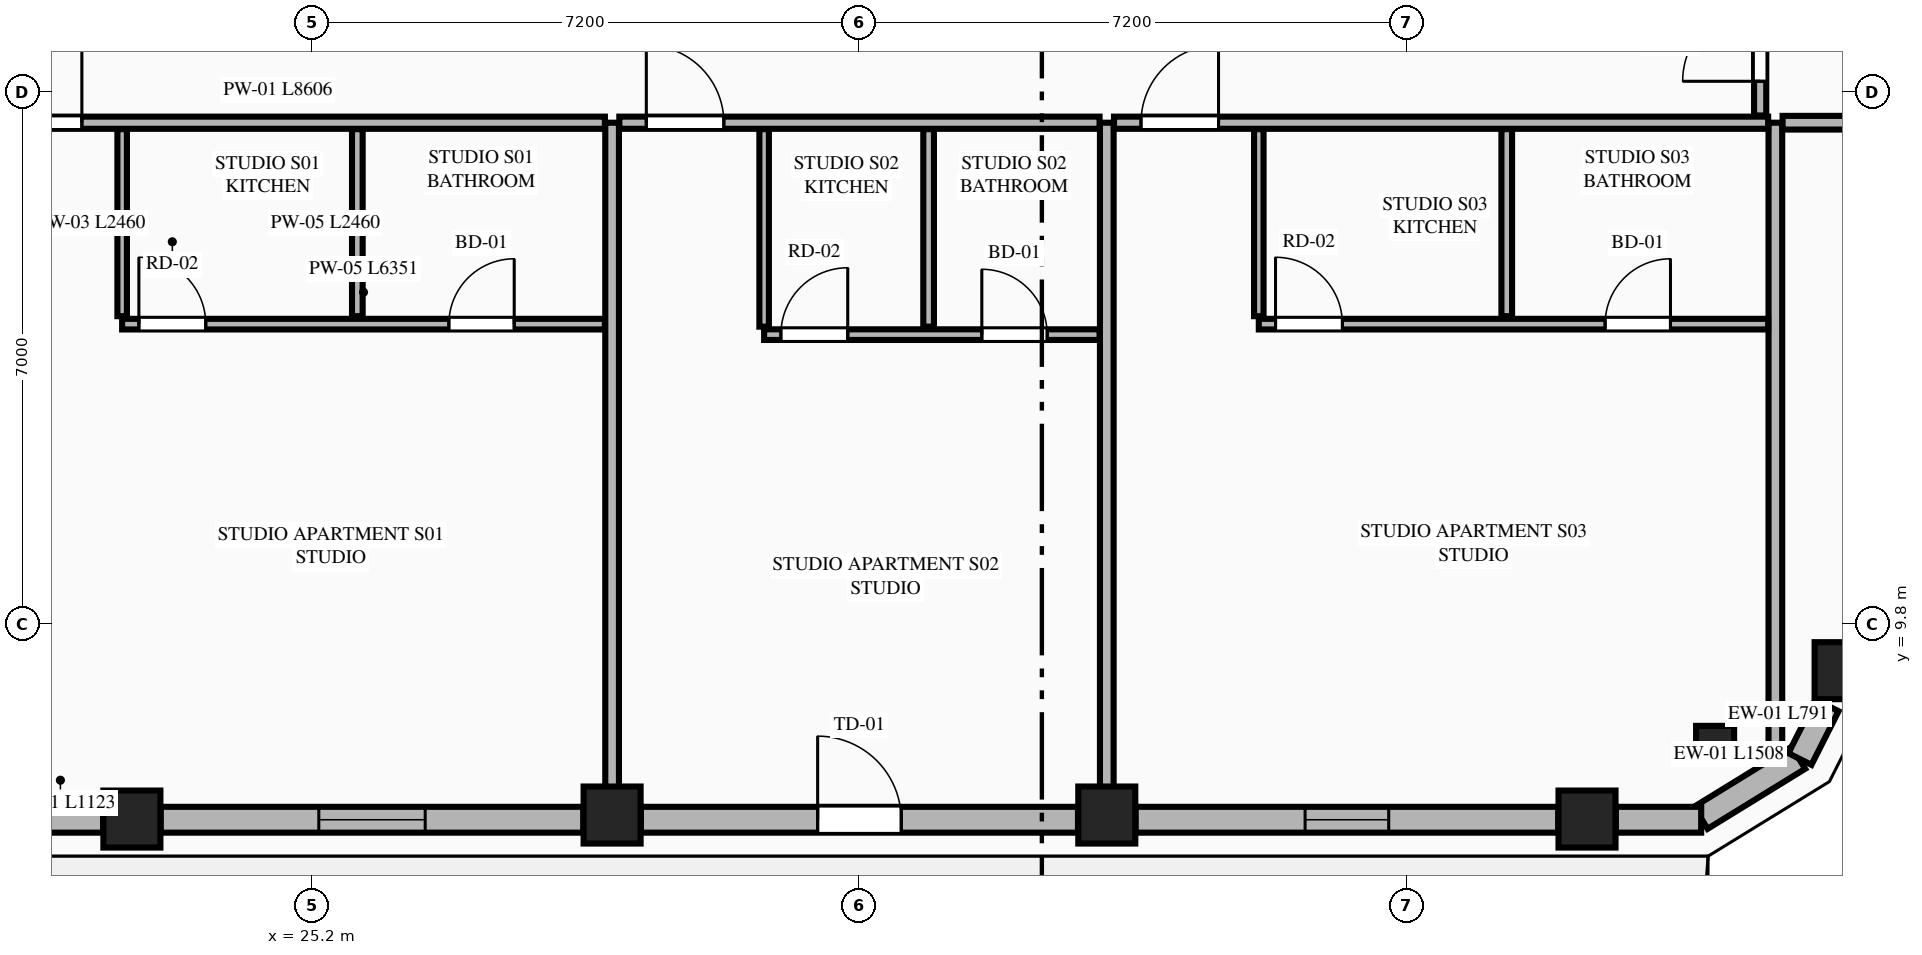
"""IFC4 building model, lengths in metres.
Left out: names, types, materials, properties, quantities, classifications, styles, units other than length and angle.
Written with IfcOpenShell. Run it as: python <this file> out.ifc"""

import sys

from ifc_helpers import new_model, si_unit, direction, frame, frame_2d, origin, origin_2d, place, context, subcontext, project, spatial, rectangle, extrude, element, fill, save


model = new_model("IFC4")
c1 = context("Model", 3, precision=1e-05, world=origin(), true_north=direction((0.0, 1.0)))
c2 = subcontext(c1, "Body", "Model", "MODEL_VIEW")
j1 = project(units=[si_unit("LENGTHUNIT", "METRE"), si_unit("PLANEANGLEUNIT", "RADIAN")], contexts=[c1])
p1 = place(None, origin())
s1 = spatial("IfcSite", under=j1, at=p1, CompositionType="ELEMENT")
p2 = place(p1, origin())
s2 = spatial("IfcBuilding", under=s1, at=p2, CompositionType="ELEMENT")
p3 = place(p2, frame((0.0, 0.0, 241.6)))
s3 = spatial("IfcBuildingStorey", under=s2, at=p3, CompositionType="ELEMENT", Elevation=241.6)
for number, where, z_axis, x_axis in (
    (1, (22.828, 7.239, 0.0), (0.0, 0.0, 1.0), (1.0, 0.0, 0.0)),
    (2, (29.146, 7.292, 0.0), (0.0, 0.0, 1.0), (1.0, 0.0, 0.0)),
    (3, (35.654, 7.292, 0.0), (0.0, 0.0, 1.0), (1.0, 0.0, 0.0)),
    (4, (41.972, 7.239, 0.0), (0.0, 0.0, 1.0), (1.0, 0.0, 0.0)),
    (5, (45.341, 9.191, 0.0), (0.0, 0.0, 1.0), (1.0, 0.0, 0.0)),
):
    element("IfcColumn", number, at=place(p3, frame(where, z_axis=z_axis, x_axis=x_axis)), inside=s3, PredefinedType="COLUMN", context=c2, shape_type="SweptSolid", body=[
        extrude(rectangle(XDim=0.75, YDim=0.75, at=origin_2d()), origin(), (0.0, 0.0, 1.0), 3.65),
    ])
p4 = place(p3, frame((43.657, 8.215, 0.0), z_axis=(0.0, 0.0, 1.0), x_axis=(0.865256437757, 0.501329529272, 0.0)))
e6 = element("IfcColumn", 6, at=p4, inside=s3, PredefinedType="PILASTER", context=c2, shape_type="SweptSolid", body=[
    extrude(rectangle(XDim=0.5, YDim=0.35, at=origin_2d()), origin(), (0.0, 0.0, 1.0), 3.65),
])
p5 = place(p3, frame((43.469, 7.255, 0.0), z_axis=(0.0, 0.0, 1.0), x_axis=(0.851680557619, 0.52406128246, 0.0)))
e7 = element("IfcWall", 7, at=p5, inside=s3, PredefinedType="STANDARD", context=c2, shape_type="SweptSolid", body=[
    extrude(rectangle(XDim=1.508, YDim=0.34, at=frame_2d((0.754, 0.0))), origin(), (0.0, 0.0, 1.0), 3.45),
])
p6 = place(p3, frame((21.326, 7.23, 0.0), z_axis=(0.0, 0.0, 1.0), x_axis=(1.0, 0.0, 0.0)))
e8 = element("IfcWall", 8, at=p6, inside=s3, PredefinedType="STANDARD", context=c2, shape_type="SweptSolid", body=[
    extrude(rectangle(XDim=1.123, YDim=0.34, at=frame_2d((0.562, 0.0))), origin(), (0.0, 0.0, 1.0), 3.45),
])
p7 = place(p3, frame((23.207, 7.23, 0.0), z_axis=(0.0, 0.0, 1.0), x_axis=(1.0, 0.0, 0.0)))
e9 = element("IfcWall", 9, at=p7, inside=s3, PredefinedType="STANDARD", context=c2, shape_type="SweptSolid", body=[
    extrude(rectangle(XDim=5.56, YDim=0.34, at=frame_2d((2.78, 0.0))), origin(), (0.0, 0.0, 1.0), 2.983),
])
p8 = place(p7, frame((2.08, 0.0, 0.75)))
e10 = element("IfcOpeningElement", 10, at=p8, cuts=e9, PredefinedType="OPENING", context=c2, shape_type="SweptSolid", body=[
    extrude(rectangle(XDim=1.4, YDim=2.05, at=frame_2d((0.7, 1.025))), frame((0.0, 0.18, 0.0), z_axis=(0.0, -1.0, 0.0), x_axis=(1.0, 0.0, 0.0)), (0.0, 0.0, 1.0), 0.36),
])
p9 = place(p3, frame((29.525, 7.23, 0.0), z_axis=(0.0, 0.0, 1.0), x_axis=(1.0, 0.0, 0.0)))
e11 = element("IfcWall", 11, at=p9, inside=s3, PredefinedType="STANDARD", context=c2, shape_type="SweptSolid", body=[
    extrude(rectangle(XDim=5.75, YDim=0.34, at=frame_2d((2.875, 0.0))), origin(), (0.0, 0.0, 1.0), 2.983),
])
p10 = place(p9, frame((2.325, 0.0, 0.0)))
e12 = element("IfcOpeningElement", 12, at=p10, cuts=e11, PredefinedType="OPENING", context=c2, shape_type="SweptSolid", body=[
    extrude(rectangle(XDim=1.1, YDim=2.25, at=frame_2d((0.55, 1.125))), frame((0.0, 0.18, 0.0), z_axis=(0.0, -1.0, 0.0), x_axis=(1.0, 0.0, 0.0)), (0.0, 0.0, 1.0), 0.36),
])
p11 = place(p3, frame((36.033, 7.23, 0.0), z_axis=(0.0, 0.0, 1.0), x_axis=(1.0, 0.0, 0.0)))
e13 = element("IfcWall", 13, at=p11, inside=s3, PredefinedType="STANDARD", context=c2, shape_type="SweptSolid", body=[
    extrude(rectangle(XDim=5.56, YDim=0.34, at=frame_2d((2.78, 0.0))), origin(), (0.0, 0.0, 1.0), 2.983),
])
p12 = place(p11, frame((2.23, 0.0, 0.75)))
e14 = element("IfcOpeningElement", 14, at=p12, cuts=e13, PredefinedType="OPENING", context=c2, shape_type="SweptSolid", body=[
    extrude(rectangle(XDim=1.1, YDim=2.0, at=frame_2d((0.55, 1.0))), frame((0.0, 0.18, 0.0), z_axis=(0.0, -1.0, 0.0), x_axis=(1.0, 0.0, 0.0)), (0.0, 0.0, 1.0), 0.36),
])
p13 = place(p3, frame((42.351, 7.23, 0.0), z_axis=(0.0, 0.0, 1.0), x_axis=(1.0, 0.0, 0.0)))
e15 = element("IfcWall", 15, at=p13, inside=s3, PredefinedType="STANDARD", context=c2, shape_type="SweptSolid", body=[
    extrude(rectangle(XDim=1.123, YDim=0.34, at=frame_2d((0.562, 0.0))), origin(), (0.0, 0.0, 1.0), 3.45),
])
p14 = place(p3, frame((44.773, 8.029, 0.0), z_axis=(0.0, 0.0, 1.0), x_axis=(0.451159191899, 0.892443490404, 0.0)))
e16 = element("IfcWall", 16, at=p14, inside=s3, PredefinedType="STANDARD", context=c2, shape_type="SweptSolid", body=[
    extrude(rectangle(XDim=0.791, YDim=0.34, at=frame_2d((0.396, 0.0))), origin(), (0.0, 0.0, 1.0), 3.45),
])
for number, where, z_axis, x_axis in (
    (17, (29.146, 7.405, 0.0), (0.0, 0.0, 1.0), (0.0, 1.0, 0.0)),
    (18, (35.654, 7.405, 0.0), (0.0, 0.0, 1.0), (0.0, 1.0, 0.0)),
):
    element("IfcWall", number, at=place(p3, frame(where, z_axis=z_axis, x_axis=x_axis)), inside=s3, PredefinedType="PARTITIONING", context=c2, shape_type="SweptSolid", body=[
        extrude(rectangle(XDim=8.995, YDim=0.18, at=frame_2d((4.498, 0.0))), origin(), (0.0, 0.0, 1.0), 2.907),
    ])
p15 = place(p3, frame((44.45, 8.119, 0.0), z_axis=(0.0, 0.0, 1.0), x_axis=(0.0, 1.0, 0.0)))
e19 = element("IfcWall", 19, at=p15, inside=s3, PredefinedType="PARTITIONING", context=c2, shape_type="SweptSolid", body=[
    extrude(rectangle(XDim=8.281, YDim=0.18, at=frame_2d((4.141, 0.0))), origin(), (0.0, 0.0, 1.0), 3.45),
])
p16 = place(p3, frame((20.445, 16.4, 0.0), z_axis=(0.0, 0.0, 1.0), x_axis=(1.0, 0.0, 0.0)))
e20 = element("IfcWall", 20, at=p16, inside=s3, PredefinedType="PARTITIONING", context=c2, shape_type="SweptSolid", body=[
    extrude(rectangle(XDim=8.606, YDim=0.16, at=frame_2d((4.303, 0.0))), origin(), (0.0, 0.0, 1.0), 3.45),
])
p17 = place(p16, frame((0.705, 0.0, 0.0)))
e21 = element("IfcOpeningElement", 21, at=p17, cuts=e20, PredefinedType="OPENING", context=c2, shape_type="SweptSolid", body=[
    extrude(rectangle(XDim=1.02, YDim=2.25, at=frame_2d((0.51, 1.125))), frame((0.0, 0.09, 0.0), z_axis=(0.0, -1.0, 0.0), x_axis=(1.0, 0.0, 0.0)), (0.0, 0.0, 1.0), 0.18),
])
p18 = place(p3, frame((22.7, 13.855, 0.0), z_axis=(0.0, 0.0, 1.0), x_axis=(0.0, 1.0, 0.0)))
e22 = element("IfcWall", 22, at=p18, inside=s3, PredefinedType="PARTITIONING", context=c2, shape_type="SweptSolid", body=[
    extrude(rectangle(XDim=2.46, YDim=0.125, at=frame_2d((1.23, 0.0))), origin(), (0.0, 0.0, 1.0), 2.907),
])
p19 = place(p3, frame((22.7, 13.75, 0.0), z_axis=(0.0, 0.0, 1.0), x_axis=(1.0, 0.0, 0.0)))
e23 = element("IfcWall", 23, at=p19, inside=s3, PredefinedType="PLUMBINGWALL", context=c2, shape_type="SweptSolid", body=[
    extrude(rectangle(XDim=6.351, YDim=0.14, at=frame_2d((3.176, 0.0))), origin(), (0.0, 0.0, 1.0), 3.45),
])
p20 = place(p19, frame((4.298, 0.0, 0.0)))
e24 = element("IfcOpeningElement", 24, at=p20, cuts=e23, PredefinedType="OPENING", context=c2, shape_type="SweptSolid", body=[
    extrude(rectangle(XDim=0.86, YDim=2.1, at=frame_2d((0.43, 1.05))), frame((0.0, 0.08, 0.0), z_axis=(0.0, -1.0, 0.0), x_axis=(1.0, 0.0, 0.0)), (0.0, 0.0, 1.0), 0.16),
])
p21 = place(p19, frame((0.22, 0.0, 0.0)))
e25 = element("IfcOpeningElement", 25, at=p21, cuts=e23, PredefinedType="OPENING", context=c2, shape_type="SweptSolid", body=[
    extrude(rectangle(XDim=0.88, YDim=2.15, at=frame_2d((0.44, 1.075))), frame((0.0, 0.08, 0.0), z_axis=(0.0, -1.0, 0.0), x_axis=(1.0, 0.0, 0.0)), (0.0, 0.0, 1.0), 0.16),
])
p22 = place(p3, frame((25.794, 13.855, 0.0), z_axis=(0.0, 0.0, 1.0), x_axis=(0.0, 1.0, 0.0)))
e26 = element("IfcWall", 26, at=p22, inside=s3, PredefinedType="PLUMBINGWALL", context=c2, shape_type="SweptSolid", body=[
    extrude(rectangle(XDim=2.46, YDim=0.14, at=frame_2d((1.23, 0.0))), origin(), (0.0, 0.0, 1.0), 3.45),
])
p23 = place(p3, frame((29.241, 16.4, 0.0), z_axis=(0.0, 0.0, 1.0), x_axis=(1.0, 0.0, 0.0)))
e27 = element("IfcWall", 27, at=p23, inside=s3, PredefinedType="PARTITIONING", context=c2, shape_type="SweptSolid", body=[
    extrude(rectangle(XDim=6.318, YDim=0.16, at=frame_2d((3.159, 0.0))), origin(), (0.0, 0.0, 1.0), 3.45),
])
p24 = place(p23, frame((0.355, 0.0, 0.0)))
e28 = element("IfcOpeningElement", 28, at=p24, cuts=e27, PredefinedType="OPENING", context=c2, shape_type="SweptSolid", body=[
    extrude(rectangle(XDim=1.02, YDim=2.25, at=frame_2d((0.51, 1.125))), frame((0.0, 0.09, 0.0), z_axis=(0.0, -1.0, 0.0), x_axis=(1.0, 0.0, 0.0)), (0.0, 0.0, 1.0), 0.18),
])
p25 = place(p3, frame((31.146, 13.717, 0.0), z_axis=(0.0, 0.0, 1.0), x_axis=(0.0, 1.0, 0.0)))
e29 = element("IfcWall", 29, at=p25, inside=s3, PredefinedType="PARTITIONING", context=c2, shape_type="SweptSolid", body=[
    extrude(rectangle(XDim=2.598, YDim=0.125, at=frame_2d((1.299, 0.0))), origin(), (0.0, 0.0, 1.0), 3.45),
])
p26 = place(p3, frame((31.146, 13.612, 0.0), z_axis=(0.0, 0.0, 1.0), x_axis=(1.0, 0.0, 0.0)))
e30 = element("IfcWall", 30, at=p26, inside=s3, PredefinedType="PLUMBINGWALL", context=c2, shape_type="SweptSolid", body=[
    extrude(rectangle(XDim=4.413, YDim=0.14, at=frame_2d((2.207, 0.0))), origin(), (0.0, 0.0, 1.0), 3.45),
])
p27 = place(p26, frame((2.864, 0.0, 0.0)))
e31 = element("IfcOpeningElement", 31, at=p27, cuts=e30, PredefinedType="OPENING", context=c2, shape_type="SweptSolid", body=[
    extrude(rectangle(XDim=0.86, YDim=2.1, at=frame_2d((0.43, 1.05))), frame((0.0, 0.08, 0.0), z_axis=(0.0, -1.0, 0.0), x_axis=(1.0, 0.0, 0.0)), (0.0, 0.0, 1.0), 0.16),
])
p28 = place(p26, frame((0.22, 0.0, 0.0)))
e32 = element("IfcOpeningElement", 32, at=p28, cuts=e30, PredefinedType="OPENING", context=c2, shape_type="SweptSolid", body=[
    extrude(rectangle(XDim=0.88, YDim=2.15, at=frame_2d((0.44, 1.075))), frame((0.0, 0.08, 0.0), z_axis=(0.0, -1.0, 0.0), x_axis=(1.0, 0.0, 0.0)), (0.0, 0.0, 1.0), 0.16),
])
p29 = place(p3, frame((33.31, 13.717, 0.0), z_axis=(0.0, 0.0, 1.0), x_axis=(0.0, 1.0, 0.0)))
e33 = element("IfcWall", 33, at=p29, inside=s3, PredefinedType="PLUMBINGWALL", context=c2, shape_type="SweptSolid", body=[
    extrude(rectangle(XDim=2.598, YDim=0.14, at=frame_2d((1.299, 0.0))), origin(), (0.0, 0.0, 1.0), 3.45),
])
p30 = place(p3, frame((35.749, 16.4, 0.0), z_axis=(0.0, 0.0, 1.0), x_axis=(1.0, 0.0, 0.0)))
e34 = element("IfcWall", 34, at=p30, inside=s3, PredefinedType="PARTITIONING", context=c2, shape_type="SweptSolid", body=[
    extrude(rectangle(XDim=8.606, YDim=0.16, at=frame_2d((4.303, 0.0))), origin(), (0.0, 0.0, 1.0), 3.45),
])
p31 = place(p30, frame((0.355, 0.0, 0.0)))
e35 = element("IfcOpeningElement", 35, at=p31, cuts=e34, PredefinedType="OPENING", context=c2, shape_type="SweptSolid", body=[
    extrude(rectangle(XDim=1.02, YDim=2.25, at=frame_2d((0.51, 1.125))), frame((0.0, 0.09, 0.0), z_axis=(0.0, -1.0, 0.0), x_axis=(1.0, 0.0, 0.0)), (0.0, 0.0, 1.0), 0.18),
])
p32 = place(p3, frame((37.654, 13.855, 0.0), z_axis=(0.0, 0.0, 1.0), x_axis=(0.0, 1.0, 0.0)))
e36 = element("IfcWall", 36, at=p32, inside=s3, PredefinedType="PARTITIONING", context=c2, shape_type="SweptSolid", body=[
    extrude(rectangle(XDim=2.46, YDim=0.125, at=frame_2d((1.23, 0.0))), origin(), (0.0, 0.0, 1.0), 3.45),
])
p33 = place(p3, frame((37.654, 13.75, 0.0), z_axis=(0.0, 0.0, 1.0), x_axis=(1.0, 0.0, 0.0)))
e37 = element("IfcWall", 37, at=p33, inside=s3, PredefinedType="PLUMBINGWALL", context=c2, shape_type="SweptSolid", body=[
    extrude(rectangle(XDim=6.701, YDim=0.14, at=frame_2d((3.351, 0.0))), origin(), (0.0, 0.0, 1.0), 3.45),
])
p34 = place(p33, frame((4.556, 0.0, 0.0)))
e38 = element("IfcOpeningElement", 38, at=p34, cuts=e37, PredefinedType="OPENING", context=c2, shape_type="SweptSolid", body=[
    extrude(rectangle(XDim=0.86, YDim=2.1, at=frame_2d((0.43, 1.05))), frame((0.0, 0.08, 0.0), z_axis=(0.0, -1.0, 0.0), x_axis=(1.0, 0.0, 0.0)), (0.0, 0.0, 1.0), 0.16),
])
p35 = place(p33, frame((0.22, 0.0, 0.0)))
e39 = element("IfcOpeningElement", 39, at=p35, cuts=e37, PredefinedType="OPENING", context=c2, shape_type="SweptSolid", body=[
    extrude(rectangle(XDim=0.88, YDim=2.15, at=frame_2d((0.44, 1.075))), frame((0.0, 0.08, 0.0), z_axis=(0.0, -1.0, 0.0), x_axis=(1.0, 0.0, 0.0)), (0.0, 0.0, 1.0), 0.16),
])
p36 = place(p3, frame((40.916, 13.855, 0.0), z_axis=(0.0, 0.0, 1.0), x_axis=(0.0, 1.0, 0.0)))
e40 = element("IfcWall", 40, at=p36, inside=s3, PredefinedType="PLUMBINGWALL", context=c2, shape_type="SweptSolid", body=[
    extrude(rectangle(XDim=2.46, YDim=0.14, at=frame_2d((1.23, 0.0))), origin(), (0.0, 0.0, 1.0), 3.45),
])
p37 = place(p3, frame((44.545, 16.4, 0.0), z_axis=(0.0, 0.0, 1.0), x_axis=(1.0, 0.0, 0.0)))
e41 = element("IfcWall", 41, at=p37, inside=s3, PredefinedType="PARTITIONING", context=c2, shape_type="SweptSolid", body=[
    extrude(rectangle(XDim=4.221, YDim=0.18, at=frame_2d((2.111, 0.0))), origin(), (0.0, 0.0, 1.0), 3.45),
])
p38 = place(p3, frame((44.25, 16.495, 0.0), z_axis=(0.0, 0.0, 1.0), x_axis=(0.0, 1.0, 0.0)))
e42 = element("IfcWall", 42, at=p38, inside=s3, PredefinedType="PARTITIONING", context=c2, shape_type="SweptSolid", body=[
    extrude(rectangle(XDim=18.41, YDim=0.16, at=frame_2d((9.205, 0.0))), origin(), (0.0, 0.0, 1.0), 3.137),
])
p39 = place(p38, frame((0.45, 0.0, 0.0)))
e43 = element("IfcOpeningElement", 43, at=p39, cuts=e42, PredefinedType="OPENING", context=c2, shape_type="SweptSolid", body=[
    extrude(rectangle(XDim=1.02, YDim=2.25, at=frame_2d((0.51, 1.125))), frame((0.0, 0.09, 0.0), z_axis=(0.0, -1.0, 0.0), x_axis=(1.0, 0.0, 0.0)), (0.0, 0.0, 1.0), 0.18),
])
p40 = place(p8, origin())
e44 = element("IfcWindow", 44, at=p40, inside=s3, PartitioningType="SINGLE_PANEL", PredefinedType="WINDOW", context=c2, shape_type="SweptSolid", body=[
    extrude(rectangle(XDim=1.4, YDim=2.05, at=frame_2d((0.7, 1.025))), frame((0.0, 0.03, 0.0), z_axis=(0.0, -1.0, 0.0), x_axis=(1.0, 0.0, 0.0)), (0.0, 0.0, 1.0), 0.06),
])
fill(e10, e44)
p41 = place(p10, origin())
e45 = element("IfcDoor", 45, at=p41, inside=s3, OperationType="SINGLE_SWING_LEFT", PredefinedType="DOOR", context=c2, shape_type="SweptSolid", body=[
    extrude(rectangle(XDim=1.1, YDim=2.25, at=frame_2d((0.55, 1.125))), frame((0.0, 0.025, 0.0), z_axis=(0.0, -1.0, 0.0), x_axis=(1.0, 0.0, 0.0)), (0.0, 0.0, 1.0), 0.05),
])
fill(e12, e45)
p42 = place(p12, origin())
e46 = element("IfcWindow", 46, at=p42, inside=s3, PartitioningType="SINGLE_PANEL", PredefinedType="WINDOW", context=c2, shape_type="SweptSolid", body=[
    extrude(rectangle(XDim=1.1, YDim=2.0, at=frame_2d((0.55, 1.0))), frame((0.0, 0.03, 0.0), z_axis=(0.0, -1.0, 0.0), x_axis=(1.0, 0.0, 0.0)), (0.0, 0.0, 1.0), 0.06),
])
fill(e14, e46)
p43 = place(p20, origin())
e47 = element("IfcDoor", 47, at=p43, inside=s3, OperationType="SINGLE_SWING_RIGHT", PredefinedType="DOOR", context=c2, shape_type="SweptSolid", body=[
    extrude(rectangle(XDim=0.86, YDim=2.1, at=frame_2d((0.43, 1.05))), frame((0.0, 0.025, 0.0), z_axis=(0.0, -1.0, 0.0), x_axis=(1.0, 0.0, 0.0)), (0.0, 0.0, 1.0), 0.05),
])
fill(e24, e47)
p44 = place(p17, origin())
e48 = element("IfcDoor", 48, at=p44, inside=s3, OperationType="SINGLE_SWING_RIGHT", PredefinedType="DOOR", context=c2, shape_type="SweptSolid", body=[
    extrude(rectangle(XDim=1.02, YDim=2.25, at=frame_2d((0.51, 1.125))), frame((0.0, 0.025, 0.0), z_axis=(0.0, -1.0, 0.0), x_axis=(1.0, 0.0, 0.0)), (0.0, 0.0, 1.0), 0.05),
])
fill(e21, e48)
p45 = place(p21, origin())
e49 = element("IfcDoor", 49, at=p45, inside=s3, OperationType="SINGLE_SWING_LEFT", PredefinedType="DOOR", context=c2, shape_type="SweptSolid", body=[
    extrude(rectangle(XDim=0.88, YDim=2.15, at=frame_2d((0.44, 1.075))), frame((0.0, 0.025, 0.0), z_axis=(0.0, -1.0, 0.0), x_axis=(1.0, 0.0, 0.0)), (0.0, 0.0, 1.0), 0.05),
])
fill(e25, e49)
p46 = place(p27, origin())
e50 = element("IfcDoor", 50, at=p46, inside=s3, OperationType="SINGLE_SWING_LEFT", PredefinedType="DOOR", context=c2, shape_type="SweptSolid", body=[
    extrude(rectangle(XDim=0.86, YDim=2.1, at=frame_2d((0.43, 1.05))), frame((0.0, 0.025, 0.0), z_axis=(0.0, -1.0, 0.0), x_axis=(1.0, 0.0, 0.0)), (0.0, 0.0, 1.0), 0.05),
])
fill(e31, e50)
p47 = place(p24, origin())
e51 = element("IfcDoor", 51, at=p47, inside=s3, OperationType="SINGLE_SWING_LEFT", PredefinedType="DOOR", context=c2, shape_type="SweptSolid", body=[
    extrude(rectangle(XDim=1.02, YDim=2.25, at=frame_2d((0.51, 1.125))), frame((0.0, 0.025, 0.0), z_axis=(0.0, -1.0, 0.0), x_axis=(1.0, 0.0, 0.0)), (0.0, 0.0, 1.0), 0.05),
])
fill(e28, e51)
p48 = place(p28, origin())
e52 = element("IfcDoor", 52, at=p48, inside=s3, OperationType="SINGLE_SWING_RIGHT", PredefinedType="DOOR", context=c2, shape_type="SweptSolid", body=[
    extrude(rectangle(XDim=0.88, YDim=2.15, at=frame_2d((0.44, 1.075))), frame((0.0, 0.025, 0.0), z_axis=(0.0, -1.0, 0.0), x_axis=(1.0, 0.0, 0.0)), (0.0, 0.0, 1.0), 0.05),
])
fill(e32, e52)
p49 = place(p34, origin())
e53 = element("IfcDoor", 53, at=p49, inside=s3, OperationType="SINGLE_SWING_RIGHT", PredefinedType="DOOR", context=c2, shape_type="SweptSolid", body=[
    extrude(rectangle(XDim=0.86, YDim=2.1, at=frame_2d((0.43, 1.05))), frame((0.0, 0.025, 0.0), z_axis=(0.0, -1.0, 0.0), x_axis=(1.0, 0.0, 0.0)), (0.0, 0.0, 1.0), 0.05),
])
fill(e38, e53)
p50 = place(p31, origin())
e54 = element("IfcDoor", 54, at=p50, inside=s3, OperationType="SINGLE_SWING_RIGHT", PredefinedType="DOOR", context=c2, shape_type="SweptSolid", body=[
    extrude(rectangle(XDim=1.02, YDim=2.25, at=frame_2d((0.51, 1.125))), frame((0.0, 0.025, 0.0), z_axis=(0.0, -1.0, 0.0), x_axis=(1.0, 0.0, 0.0)), (0.0, 0.0, 1.0), 0.05),
])
fill(e35, e54)
p51 = place(p35, origin())
e55 = element("IfcDoor", 55, at=p51, inside=s3, OperationType="SINGLE_SWING_LEFT", PredefinedType="DOOR", context=c2, shape_type="SweptSolid", body=[
    extrude(rectangle(XDim=0.88, YDim=2.15, at=frame_2d((0.44, 1.075))), frame((0.0, 0.025, 0.0), z_axis=(0.0, -1.0, 0.0), x_axis=(1.0, 0.0, 0.0)), (0.0, 0.0, 1.0), 0.05),
])
fill(e39, e55)
p52 = place(p39, origin())
e56 = element("IfcDoor", 56, at=p52, inside=s3, OperationType="SINGLE_SWING_LEFT", PredefinedType="DOOR", context=c2, shape_type="SweptSolid", body=[
    extrude(rectangle(XDim=1.02, YDim=2.25, at=frame_2d((0.51, 1.125))), frame((0.0, 0.025, 0.0), z_axis=(0.0, -1.0, 0.0), x_axis=(1.0, 0.0, 0.0)), (0.0, 0.0, 1.0), 0.05),
])
fill(e43, e56)
save(model, sys.argv[1])
